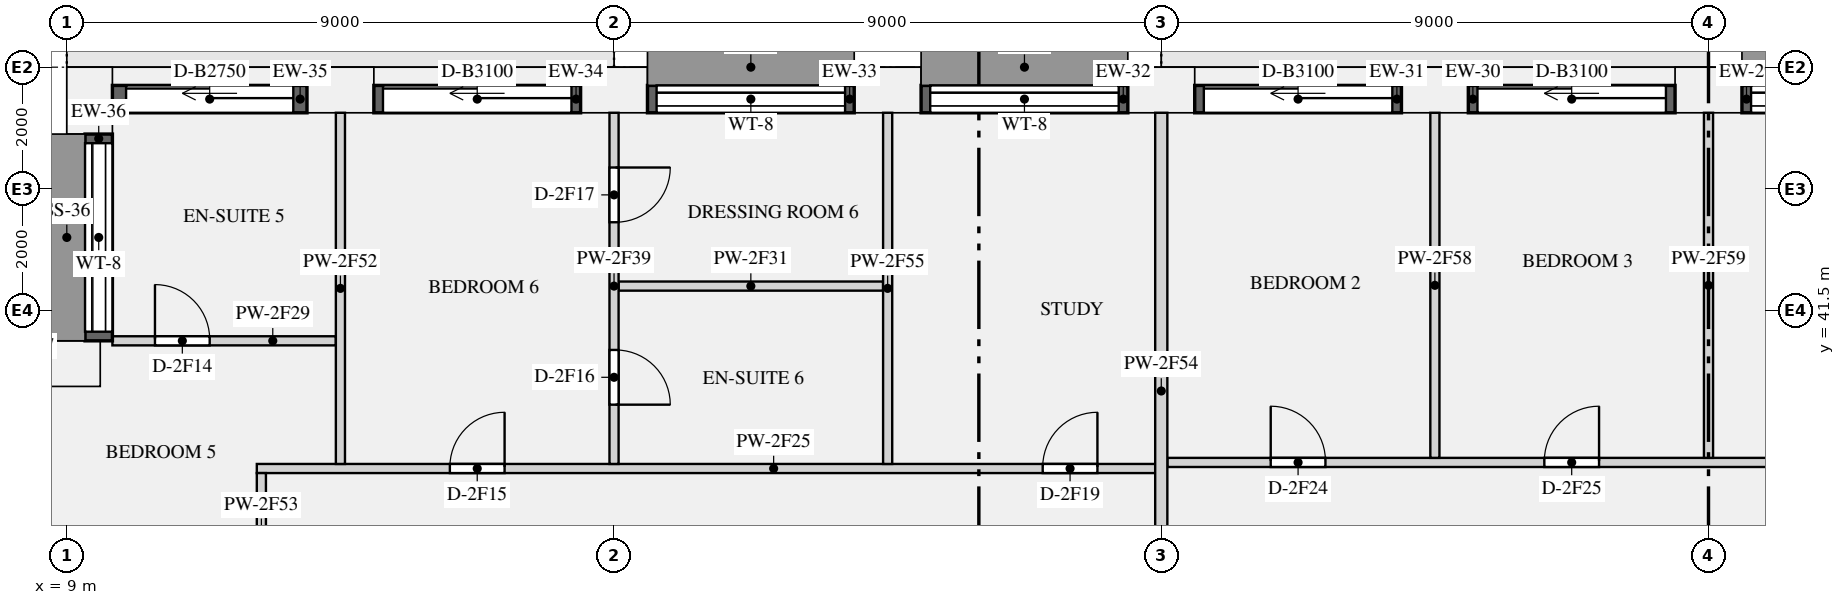
"""IFC4 building model, lengths in metres.
Left out: names, types, materials, properties, quantities, classifications, styles, units other than length and angle.
Written with IfcOpenShell. Run it as: python <this file> out.ifc"""

import sys

from ifc_helpers import new_model, si_unit, direction, frame, frame_2d, origin, origin_2d, place, context, subcontext, project, spatial, rectangle, extrude, element, fill, save


model = new_model("IFC4")
c1 = context("Model", 3, precision=1e-05, world=origin(), true_north=direction((0.0, 1.0)))
c2 = subcontext(c1, "Body", "Model", "MODEL_VIEW")
j1 = project(units=[si_unit("LENGTHUNIT", "METRE"), si_unit("PLANEANGLEUNIT", "RADIAN")], contexts=[c1])
p1 = place(None, origin())
s1 = spatial("IfcSite", under=j1, at=p1, CompositionType="ELEMENT")
p2 = place(p1, origin())
s2 = spatial("IfcBuilding", under=s1, at=p2, CompositionType="ELEMENT")
p3 = place(p2, frame((0.0, 0.0, 124.5)))
s3 = spatial("IfcBuildingStorey", under=s2, at=p3, CompositionType="ELEMENT", Elevation=124.5)
for number, where, z_axis, x_axis in (
    (1, (36.0, 45.125, 0.0), (0.0, 0.0, 1.0), (-1.0, 0.0, 0.0)),
    (2, (31.5, 45.125, 0.0), (0.0, 0.0, 1.0), (-1.0, 0.0, 0.0)),
    (3, (27.0, 45.125, 0.0), (0.0, 0.0, 1.0), (-1.0, 0.0, 0.0)),
    (4, (22.5, 45.125, 0.0), (0.0, 0.0, 1.0), (-1.0, 0.0, 0.0)),
    (5, (18.0, 45.125, 0.0), (0.0, 0.0, 1.0), (-1.0, 0.0, 0.0)),
    (6, (13.5, 45.125, 0.0), (0.0, 0.0, 1.0), (-1.0, 0.0, 0.0)),
    (7, (9.375, 44.95, 0.0), (0.0, 0.0, 1.0), (0.0, -1.0, 0.0)),
    (8, (9.0, 40.625, 0.0), (0.0, 0.0, 1.0), (-1.0, 0.0, 0.0)),
):
    element("IfcColumn", number, at=place(p3, frame(where, z_axis=z_axis, x_axis=x_axis)), inside=s3, PredefinedType="USERDEFINED", context=c2, shape_type="SweptSolid", body=[
        extrude(rectangle(XDim=1.1, YDim=0.75, at=origin_2d()), origin(), (0.0, 0.0, 1.0), 3.15),
    ])
p4 = place(p3, frame((39.95, 44.975, 0.9), z_axis=(0.0, 0.0, 1.0), x_axis=(-1.0, 0.0, 0.0)))
e9 = element("IfcWall", 9, at=p4, inside=s3, PredefinedType="SOLIDWALL", context=c2, shape_type="SweptSolid", body=[
    extrude(rectangle(XDim=3.4, YDim=0.45, at=frame_2d((1.7, 0.0))), origin(), (0.0, 0.0, 1.0), 1.93),
])
p5 = place(p4, frame((0.15, 0.0, 0.15)))
e10 = element("IfcOpeningElement", 10, at=p5, cuts=e9, PredefinedType="OPENING", context=c2, shape_type="SweptSolid", body=[
    extrude(rectangle(XDim=3.1, YDim=1.5, at=frame_2d((1.55, 0.75))), frame((0.0, 0.235, 0.0), z_axis=(0.0, -1.0, 0.0), x_axis=(1.0, 0.0, 0.0)), (0.0, 0.0, 1.0), 0.47),
])
p6 = place(p3, frame((35.45, 44.975, 0.0), z_axis=(0.0, 0.0, 1.0), x_axis=(-1.0, 0.0, 0.0)))
e11 = element("IfcWall", 11, at=p6, inside=s3, PredefinedType="SOLIDWALL", context=c2, shape_type="SweptSolid", body=[
    extrude(rectangle(XDim=3.4, YDim=0.45, at=frame_2d((1.7, 0.0))), origin(), (0.0, 0.0, 1.0), 2.83),
])
p7 = place(p6, frame((0.15, 0.0, 0.0)))
e12 = element("IfcOpeningElement", 12, at=p7, cuts=e11, PredefinedType="OPENING", context=c2, shape_type="SweptSolid", body=[
    extrude(rectangle(XDim=3.1, YDim=2.3, at=frame_2d((1.55, 1.15))), frame((0.0, 0.235, 0.0), z_axis=(0.0, -1.0, 0.0), x_axis=(1.0, 0.0, 0.0)), (0.0, 0.0, 1.0), 0.47),
])
p8 = place(p3, frame((30.95, 44.975, 0.0), z_axis=(0.0, 0.0, 1.0), x_axis=(-1.0, 0.0, 0.0)))
e13 = element("IfcWall", 13, at=p8, inside=s3, PredefinedType="SOLIDWALL", context=c2, shape_type="SweptSolid", body=[
    extrude(rectangle(XDim=3.4, YDim=0.45, at=frame_2d((1.7, 0.0))), origin(), (0.0, 0.0, 1.0), 2.83),
])
p9 = place(p8, frame((0.15, 0.0, 0.0)))
e14 = element("IfcOpeningElement", 14, at=p9, cuts=e13, PredefinedType="OPENING", context=c2, shape_type="SweptSolid", body=[
    extrude(rectangle(XDim=3.1, YDim=2.3, at=frame_2d((1.55, 1.15))), frame((0.0, 0.235, 0.0), z_axis=(0.0, -1.0, 0.0), x_axis=(1.0, 0.0, 0.0)), (0.0, 0.0, 1.0), 0.47),
])
p10 = place(p3, frame((26.45, 44.975, 0.9), z_axis=(0.0, 0.0, 1.0), x_axis=(-1.0, 0.0, 0.0)))
e15 = element("IfcWall", 15, at=p10, inside=s3, PredefinedType="SOLIDWALL", context=c2, shape_type="SweptSolid", body=[
    extrude(rectangle(XDim=3.4, YDim=0.45, at=frame_2d((1.7, 0.0))), origin(), (0.0, 0.0, 1.0), 1.93),
])
p11 = place(p10, frame((0.15, 0.0, 0.15)))
e16 = element("IfcOpeningElement", 16, at=p11, cuts=e15, PredefinedType="OPENING", context=c2, shape_type="SweptSolid", body=[
    extrude(rectangle(XDim=3.1, YDim=1.5, at=frame_2d((1.55, 0.75))), frame((0.0, 0.235, 0.0), z_axis=(0.0, -1.0, 0.0), x_axis=(1.0, 0.0, 0.0)), (0.0, 0.0, 1.0), 0.47),
])
p12 = place(p3, frame((21.95, 44.975, 0.9), z_axis=(0.0, 0.0, 1.0), x_axis=(-1.0, 0.0, 0.0)))
e17 = element("IfcWall", 17, at=p12, inside=s3, PredefinedType="SOLIDWALL", context=c2, shape_type="SweptSolid", body=[
    extrude(rectangle(XDim=3.4, YDim=0.45, at=frame_2d((1.7, 0.0))), origin(), (0.0, 0.0, 1.0), 1.93),
])
p13 = place(p12, frame((0.15, 0.0, 0.15)))
e18 = element("IfcOpeningElement", 18, at=p13, cuts=e17, PredefinedType="OPENING", context=c2, shape_type="SweptSolid", body=[
    extrude(rectangle(XDim=3.1, YDim=1.5, at=frame_2d((1.55, 0.75))), frame((0.0, 0.235, 0.0), z_axis=(0.0, -1.0, 0.0), x_axis=(1.0, 0.0, 0.0)), (0.0, 0.0, 1.0), 0.47),
])
p14 = place(p3, frame((17.45, 44.975, 0.0), z_axis=(0.0, 0.0, 1.0), x_axis=(-1.0, 0.0, 0.0)))
e19 = element("IfcWall", 19, at=p14, inside=s3, PredefinedType="SOLIDWALL", context=c2, shape_type="SweptSolid", body=[
    extrude(rectangle(XDim=3.4, YDim=0.45, at=frame_2d((1.7, 0.0))), origin(), (0.0, 0.0, 1.0), 2.83),
])
p15 = place(p14, frame((0.15, 0.0, 0.0)))
e20 = element("IfcOpeningElement", 20, at=p15, cuts=e19, PredefinedType="OPENING", context=c2, shape_type="SweptSolid", body=[
    extrude(rectangle(XDim=3.1, YDim=2.3, at=frame_2d((1.55, 1.15))), frame((0.0, 0.235, 0.0), z_axis=(0.0, -1.0, 0.0), x_axis=(1.0, 0.0, 0.0)), (0.0, 0.0, 1.0), 0.47),
])
p16 = place(p3, frame((12.95, 44.975, 0.0), z_axis=(0.0, 0.0, 1.0), x_axis=(-1.0, 0.0, 0.0)))
e21 = element("IfcWall", 21, at=p16, inside=s3, PredefinedType="SOLIDWALL", context=c2, shape_type="SweptSolid", body=[
    extrude(rectangle(XDim=3.2, YDim=0.45, at=frame_2d((1.6, 0.0))), origin(), (0.0, 0.0, 1.0), 2.83),
])
p17 = place(p16, frame((0.225, 0.0, 0.0)))
e22 = element("IfcOpeningElement", 22, at=p17, cuts=e21, PredefinedType="OPENING", context=c2, shape_type="SweptSolid", body=[
    extrude(rectangle(XDim=2.75, YDim=2.3, at=frame_2d((1.375, 1.15))), frame((0.0, 0.235, 0.0), z_axis=(0.0, -1.0, 0.0), x_axis=(1.0, 0.0, 0.0)), (0.0, 0.0, 1.0), 0.47),
])
p18 = place(p3, frame((9.525, 44.4, 0.9), z_axis=(0.0, 0.0, 1.0), x_axis=(0.0, -1.0, 0.0)))
e23 = element("IfcWall", 23, at=p18, inside=s3, PredefinedType="SOLIDWALL", context=c2, shape_type="SweptSolid", body=[
    extrude(rectangle(XDim=3.4, YDim=0.45, at=frame_2d((1.7, 0.0))), origin(), (0.0, 0.0, 1.0), 1.93),
])
p19 = place(p18, frame((0.15, 0.0, 0.15)))
e24 = element("IfcOpeningElement", 24, at=p19, cuts=e23, PredefinedType="OPENING", context=c2, shape_type="SweptSolid", body=[
    extrude(rectangle(XDim=3.1, YDim=1.5, at=frame_2d((1.55, 0.75))), frame((0.0, 0.235, 0.0), z_axis=(0.0, -1.0, 0.0), x_axis=(1.0, 0.0, 0.0)), (0.0, 0.0, 1.0), 0.47),
])
p20 = place(p3, frame((12.125, 38.9, 0.0), z_axis=(0.0, 0.0, 1.0), x_axis=(1.0, 0.0, 0.0)))
e25 = element("IfcWall", 25, at=p20, inside=s3, PredefinedType="PARTITIONING", context=c2, shape_type="SweptSolid", body=[
    extrude(rectangle(XDim=14.775, YDim=0.15, at=frame_2d((7.387, 0.0))), origin(), (0.0, 0.0, 1.0), 2.83),
])
p21 = place(p20, frame((3.175, 0.0, 0.0)))
e26 = element("IfcOpeningElement", 26, at=p21, cuts=e25, PredefinedType="OPENING", context=c2, shape_type="SweptSolid", body=[
    extrude(rectangle(XDim=0.9, YDim=2.1, at=frame_2d((0.45, 1.05))), frame((0.0, 0.085, 0.0), z_axis=(0.0, -1.0, 0.0), x_axis=(1.0, 0.0, 0.0)), (0.0, 0.0, 1.0), 0.17),
])
p22 = place(p20, frame((12.925, 0.0, 0.0)))
e27 = element("IfcOpeningElement", 27, at=p22, cuts=e25, PredefinedType="OPENING", context=c2, shape_type="SweptSolid", body=[
    extrude(rectangle(XDim=0.9, YDim=2.1, at=frame_2d((0.45, 1.05))), frame((0.0, 0.085, 0.0), z_axis=(0.0, -1.0, 0.0), x_axis=(1.0, 0.0, 0.0)), (0.0, 0.0, 1.0), 0.17),
])
p23 = place(p3, frame((9.75, 41.0, 0.0), z_axis=(0.0, 0.0, 1.0), x_axis=(1.0, 0.0, 0.0)))
e28 = element("IfcWall", 28, at=p23, inside=s3, PredefinedType="PARTITIONING", context=c2, shape_type="SweptSolid", body=[
    extrude(rectangle(XDim=3.675, YDim=0.15, at=frame_2d((1.837, 0.0))), origin(), (0.0, 0.0, 1.0), 2.83),
])
p24 = place(p23, frame((0.7, 0.0, 0.0)))
e29 = element("IfcOpeningElement", 29, at=p24, cuts=e28, PredefinedType="OPENING", context=c2, shape_type="SweptSolid", body=[
    extrude(rectangle(XDim=0.9, YDim=2.1, at=frame_2d((0.45, 1.05))), frame((0.0, 0.085, 0.0), z_axis=(0.0, -1.0, 0.0), x_axis=(1.0, 0.0, 0.0)), (0.0, 0.0, 1.0), 0.17),
])
p25 = place(p3, frame((18.075, 41.9, 0.0), z_axis=(0.0, 0.0, 1.0), x_axis=(1.0, 0.0, 0.0)))
e30 = element("IfcWall", 30, at=p25, inside=s3, PredefinedType="PARTITIONING", context=c2, shape_type="SweptSolid", body=[
    extrude(rectangle(XDim=4.35, YDim=0.15, at=frame_2d((2.175, 0.0))), origin(), (0.0, 0.0, 1.0), 2.83),
])
p26 = place(p3, frame((27.1, 39.0, 0.0), z_axis=(0.0, 0.0, 1.0), x_axis=(1.0, 0.0, 0.0)))
e31 = element("IfcWall", 31, at=p26, inside=s3, PredefinedType="PARTITIONING", context=c2, shape_type="SweptSolid", body=[
    extrude(rectangle(XDim=22.475, YDim=0.15, at=frame_2d((11.237, 0.0))), origin(), (0.0, 0.0, 1.0), 2.83),
])
p27 = place(p26, frame((1.7, 0.0, 0.0)))
e32 = element("IfcOpeningElement", 32, at=p27, cuts=e31, PredefinedType="OPENING", context=c2, shape_type="SweptSolid", body=[
    extrude(rectangle(XDim=0.9, YDim=2.1, at=frame_2d((0.45, 1.05))), frame((0.0, 0.085, 0.0), z_axis=(0.0, -1.0, 0.0), x_axis=(1.0, 0.0, 0.0)), (0.0, 0.0, 1.0), 0.17),
])
p28 = place(p26, frame((6.2, 0.0, 0.0)))
e33 = element("IfcOpeningElement", 33, at=p28, cuts=e31, PredefinedType="OPENING", context=c2, shape_type="SweptSolid", body=[
    extrude(rectangle(XDim=0.9, YDim=2.1, at=frame_2d((0.45, 1.05))), frame((0.0, 0.085, 0.0), z_axis=(0.0, -1.0, 0.0), x_axis=(1.0, 0.0, 0.0)), (0.0, 0.0, 1.0), 0.17),
])
p29 = place(p26, frame((12.95, 0.0, 0.0)))
e34 = element("IfcOpeningElement", 34, at=p29, cuts=e31, PredefinedType="OPENING", context=c2, shape_type="SweptSolid", body=[
    extrude(rectangle(XDim=0.9, YDim=2.1, at=frame_2d((0.45, 1.05))), frame((0.0, 0.085, 0.0), z_axis=(0.0, -1.0, 0.0), x_axis=(1.0, 0.0, 0.0)), (0.0, 0.0, 1.0), 0.17),
])
p30 = place(p3, frame((18.0, 38.975, 0.0), z_axis=(0.0, 0.0, 1.0), x_axis=(0.0, 1.0, 0.0)))
e35 = element("IfcWall", 35, at=p30, inside=s3, PredefinedType="PARTITIONING", context=c2, shape_type="SweptSolid", body=[
    extrude(rectangle(XDim=5.775, YDim=0.15, at=frame_2d((2.887, 0.0))), origin(), (0.0, 0.0, 1.0), 2.83),
])
p31 = place(p30, frame((0.975, 0.0, 0.0)))
e36 = element("IfcOpeningElement", 36, at=p31, cuts=e35, PredefinedType="OPENING", context=c2, shape_type="SweptSolid", body=[
    extrude(rectangle(XDim=0.9, YDim=2.1, at=frame_2d((0.45, 1.05))), frame((0.0, 0.085, 0.0), z_axis=(0.0, -1.0, 0.0), x_axis=(1.0, 0.0, 0.0)), (0.0, 0.0, 1.0), 0.17),
])
p32 = place(p30, frame((3.975, 0.0, 0.0)))
e37 = element("IfcOpeningElement", 37, at=p32, cuts=e35, PredefinedType="OPENING", context=c2, shape_type="SweptSolid", body=[
    extrude(rectangle(XDim=0.9, YDim=2.1, at=frame_2d((0.45, 1.05))), frame((0.0, 0.085, 0.0), z_axis=(0.0, -1.0, 0.0), x_axis=(1.0, 0.0, 0.0)), (0.0, 0.0, 1.0), 0.17),
])
p33 = place(p3, frame((13.5, 38.975, 0.0), z_axis=(0.0, 0.0, 1.0), x_axis=(0.0, 1.0, 0.0)))
e38 = element("IfcWall", 38, at=p33, inside=s3, PredefinedType="PARTITIONING", context=c2, shape_type="SweptSolid", body=[
    extrude(rectangle(XDim=5.775, YDim=0.15, at=frame_2d((2.887, 0.0))), origin(), (0.0, 0.0, 1.0), 2.83),
])
p34 = place(p3, frame((12.2, 36.908, 0.0), z_axis=(0.0, 0.0, 1.0), x_axis=(0.0, 1.0, 0.0)))
e39 = element("IfcWall", 39, at=p34, inside=s3, PredefinedType="PARTITIONING", context=c2, shape_type="SweptSolid", body=[
    extrude(rectangle(XDim=1.917, YDim=0.15, at=frame_2d((0.958, 0.0))), origin(), (0.0, 0.0, 1.0), 2.83),
])
p35 = place(p3, frame((27.0, 35.6, 0.0), z_axis=(0.0, 0.0, 1.0), x_axis=(0.0, 1.0, 0.0)))
e40 = element("IfcWall", 40, at=p35, inside=s3, PredefinedType="PARTITIONING", context=c2, shape_type="SweptSolid", body=[
    extrude(rectangle(XDim=9.15, YDim=0.2, at=frame_2d((4.575, 0.0))), origin(), (0.0, 0.0, 1.0), 2.83),
])
p36 = place(p3, frame((22.5, 38.975, 0.0), z_axis=(0.0, 0.0, 1.0), x_axis=(0.0, 1.0, 0.0)))
e41 = element("IfcWall", 41, at=p36, inside=s3, PredefinedType="PARTITIONING", context=c2, shape_type="SweptSolid", body=[
    extrude(rectangle(XDim=5.775, YDim=0.15, at=frame_2d((2.887, 0.0))), origin(), (0.0, 0.0, 1.0), 2.83),
])
for number, where, z_axis, x_axis in (
    (42, (31.5, 39.075, 0.0), (0.0, 0.0, 1.0), (0.0, 1.0, 0.0)),
    (43, (36.0, 39.075, 0.0), (0.0, 0.0, 1.0), (0.0, 1.0, 0.0)),
):
    element("IfcWall", number, at=place(p3, frame(where, z_axis=z_axis, x_axis=x_axis)), inside=s3, PredefinedType="PARTITIONING", context=c2, shape_type="SweptSolid", body=[
        extrude(rectangle(XDim=5.675, YDim=0.15, at=frame_2d((2.837, 0.0))), origin(), (0.0, 0.0, 1.0), 2.83),
    ])
p37 = place(p5, origin())
e44 = element("IfcWindow", 44, at=p37, inside=s3, PartitioningType="SINGLE_PANEL", PredefinedType="WINDOW", context=c2, shape_type="SweptSolid", body=[
    extrude(rectangle(XDim=3.1, YDim=1.5, at=frame_2d((1.55, 0.75))), frame((0.0, -0.065, 0.0), z_axis=(0.0, -1.0, 0.0), x_axis=(1.0, 0.0, 0.0)), (0.0, 0.0, 1.0), 0.06),
])
fill(e10, e44)
p38 = place(p7, origin())
e45 = element("IfcDoor", 45, at=p38, inside=s3, OperationType="SLIDING_TO_LEFT", PredefinedType="DOOR", context=c2, shape_type="SweptSolid", body=[
    extrude(rectangle(XDim=3.1, YDim=2.3, at=frame_2d((1.55, 1.15))), frame((0.0, -0.07, 0.0), z_axis=(0.0, -1.0, 0.0), x_axis=(1.0, 0.0, 0.0)), (0.0, 0.0, 1.0), 0.05),
])
fill(e12, e45)
p39 = place(p9, origin())
e46 = element("IfcDoor", 46, at=p39, inside=s3, OperationType="SLIDING_TO_LEFT", PredefinedType="DOOR", context=c2, shape_type="SweptSolid", body=[
    extrude(rectangle(XDim=3.1, YDim=2.3, at=frame_2d((1.55, 1.15))), frame((0.0, -0.07, 0.0), z_axis=(0.0, -1.0, 0.0), x_axis=(1.0, 0.0, 0.0)), (0.0, 0.0, 1.0), 0.05),
])
fill(e14, e46)
p40 = place(p11, origin())
e47 = element("IfcWindow", 47, at=p40, inside=s3, PartitioningType="SINGLE_PANEL", PredefinedType="WINDOW", context=c2, shape_type="SweptSolid", body=[
    extrude(rectangle(XDim=3.1, YDim=1.5, at=frame_2d((1.55, 0.75))), frame((0.0, -0.065, 0.0), z_axis=(0.0, -1.0, 0.0), x_axis=(1.0, 0.0, 0.0)), (0.0, 0.0, 1.0), 0.06),
])
fill(e16, e47)
p41 = place(p13, origin())
e48 = element("IfcWindow", 48, at=p41, inside=s3, PartitioningType="SINGLE_PANEL", PredefinedType="WINDOW", context=c2, shape_type="SweptSolid", body=[
    extrude(rectangle(XDim=3.1, YDim=1.5, at=frame_2d((1.55, 0.75))), frame((0.0, -0.065, 0.0), z_axis=(0.0, -1.0, 0.0), x_axis=(1.0, 0.0, 0.0)), (0.0, 0.0, 1.0), 0.06),
])
fill(e18, e48)
p42 = place(p15, origin())
e49 = element("IfcDoor", 49, at=p42, inside=s3, OperationType="SLIDING_TO_LEFT", PredefinedType="DOOR", context=c2, shape_type="SweptSolid", body=[
    extrude(rectangle(XDim=3.1, YDim=2.3, at=frame_2d((1.55, 1.15))), frame((0.0, -0.07, 0.0), z_axis=(0.0, -1.0, 0.0), x_axis=(1.0, 0.0, 0.0)), (0.0, 0.0, 1.0), 0.05),
])
fill(e20, e49)
p43 = place(p17, origin())
e50 = element("IfcDoor", 50, at=p43, inside=s3, OperationType="SLIDING_TO_LEFT", PredefinedType="DOOR", context=c2, shape_type="SweptSolid", body=[
    extrude(rectangle(XDim=2.75, YDim=2.3, at=frame_2d((1.375, 1.15))), frame((0.0, -0.07, 0.0), z_axis=(0.0, -1.0, 0.0), x_axis=(1.0, 0.0, 0.0)), (0.0, 0.0, 1.0), 0.05),
])
fill(e22, e50)
p44 = place(p19, origin())
e51 = element("IfcWindow", 51, at=p44, inside=s3, PartitioningType="SINGLE_PANEL", PredefinedType="WINDOW", context=c2, shape_type="SweptSolid", body=[
    extrude(rectangle(XDim=3.1, YDim=1.5, at=frame_2d((1.55, 0.75))), frame((0.0, -0.065, 0.0), z_axis=(0.0, -1.0, 0.0), x_axis=(1.0, 0.0, 0.0)), (0.0, 0.0, 1.0), 0.06),
])
fill(e24, e51)
p45 = place(p24, origin())
e52 = element("IfcDoor", 52, at=p45, inside=s3, OperationType="SINGLE_SWING_LEFT", PredefinedType="DOOR", context=c2, shape_type="SweptSolid", body=[
    extrude(rectangle(XDim=0.9, YDim=2.1, at=frame_2d((0.45, 1.05))), frame((0.0, 0.025, 0.0), z_axis=(0.0, -1.0, 0.0), x_axis=(1.0, 0.0, 0.0)), (0.0, 0.0, 1.0), 0.05),
])
fill(e29, e52)
p46 = place(p21, origin())
e53 = element("IfcDoor", 53, at=p46, inside=s3, OperationType="SINGLE_SWING_RIGHT", PredefinedType="DOOR", context=c2, shape_type="SweptSolid", body=[
    extrude(rectangle(XDim=0.9, YDim=2.1, at=frame_2d((0.45, 1.05))), frame((0.0, 0.025, 0.0), z_axis=(0.0, -1.0, 0.0), x_axis=(1.0, 0.0, 0.0)), (0.0, 0.0, 1.0), 0.05),
])
fill(e26, e53)
p47 = place(p31, frame((0.9, 0.0, 0.0), z_axis=(0.0, 0.0, 1.0), x_axis=(-1.0, 0.0, 0.0)))
e54 = element("IfcDoor", 54, at=p47, inside=s3, OperationType="SINGLE_SWING_RIGHT", PredefinedType="DOOR", context=c2, shape_type="SweptSolid", body=[
    extrude(rectangle(XDim=0.9, YDim=2.1, at=frame_2d((0.45, 1.05))), frame((0.0, 0.025, 0.0), z_axis=(0.0, -1.0, 0.0), x_axis=(1.0, 0.0, 0.0)), (0.0, 0.0, 1.0), 0.05),
])
fill(e36, e54)
p48 = place(p32, frame((0.9, 0.0, 0.0), z_axis=(0.0, 0.0, 1.0), x_axis=(-1.0, 0.0, 0.0)))
e55 = element("IfcDoor", 55, at=p48, inside=s3, OperationType="SINGLE_SWING_LEFT", PredefinedType="DOOR", context=c2, shape_type="SweptSolid", body=[
    extrude(rectangle(XDim=0.9, YDim=2.1, at=frame_2d((0.45, 1.05))), frame((0.0, 0.025, 0.0), z_axis=(0.0, -1.0, 0.0), x_axis=(1.0, 0.0, 0.0)), (0.0, 0.0, 1.0), 0.05),
])
fill(e37, e55)
p49 = place(p22, origin())
e56 = element("IfcDoor", 56, at=p49, inside=s3, OperationType="SINGLE_SWING_RIGHT", PredefinedType="DOOR", context=c2, shape_type="SweptSolid", body=[
    extrude(rectangle(XDim=0.9, YDim=2.1, at=frame_2d((0.45, 1.05))), frame((0.0, 0.025, 0.0), z_axis=(0.0, -1.0, 0.0), x_axis=(1.0, 0.0, 0.0)), (0.0, 0.0, 1.0), 0.05),
])
fill(e27, e56)
p50 = place(p27, origin())
e57 = element("IfcDoor", 57, at=p50, inside=s3, OperationType="SINGLE_SWING_LEFT", PredefinedType="DOOR", context=c2, shape_type="SweptSolid", body=[
    extrude(rectangle(XDim=0.9, YDim=2.1, at=frame_2d((0.45, 1.05))), frame((0.0, 0.025, 0.0), z_axis=(0.0, -1.0, 0.0), x_axis=(1.0, 0.0, 0.0)), (0.0, 0.0, 1.0), 0.05),
])
fill(e32, e57)
p51 = place(p28, origin())
e58 = element("IfcDoor", 58, at=p51, inside=s3, OperationType="SINGLE_SWING_RIGHT", PredefinedType="DOOR", context=c2, shape_type="SweptSolid", body=[
    extrude(rectangle(XDim=0.9, YDim=2.1, at=frame_2d((0.45, 1.05))), frame((0.0, 0.025, 0.0), z_axis=(0.0, -1.0, 0.0), x_axis=(1.0, 0.0, 0.0)), (0.0, 0.0, 1.0), 0.05),
])
fill(e33, e58)
save(model, sys.argv[1])
